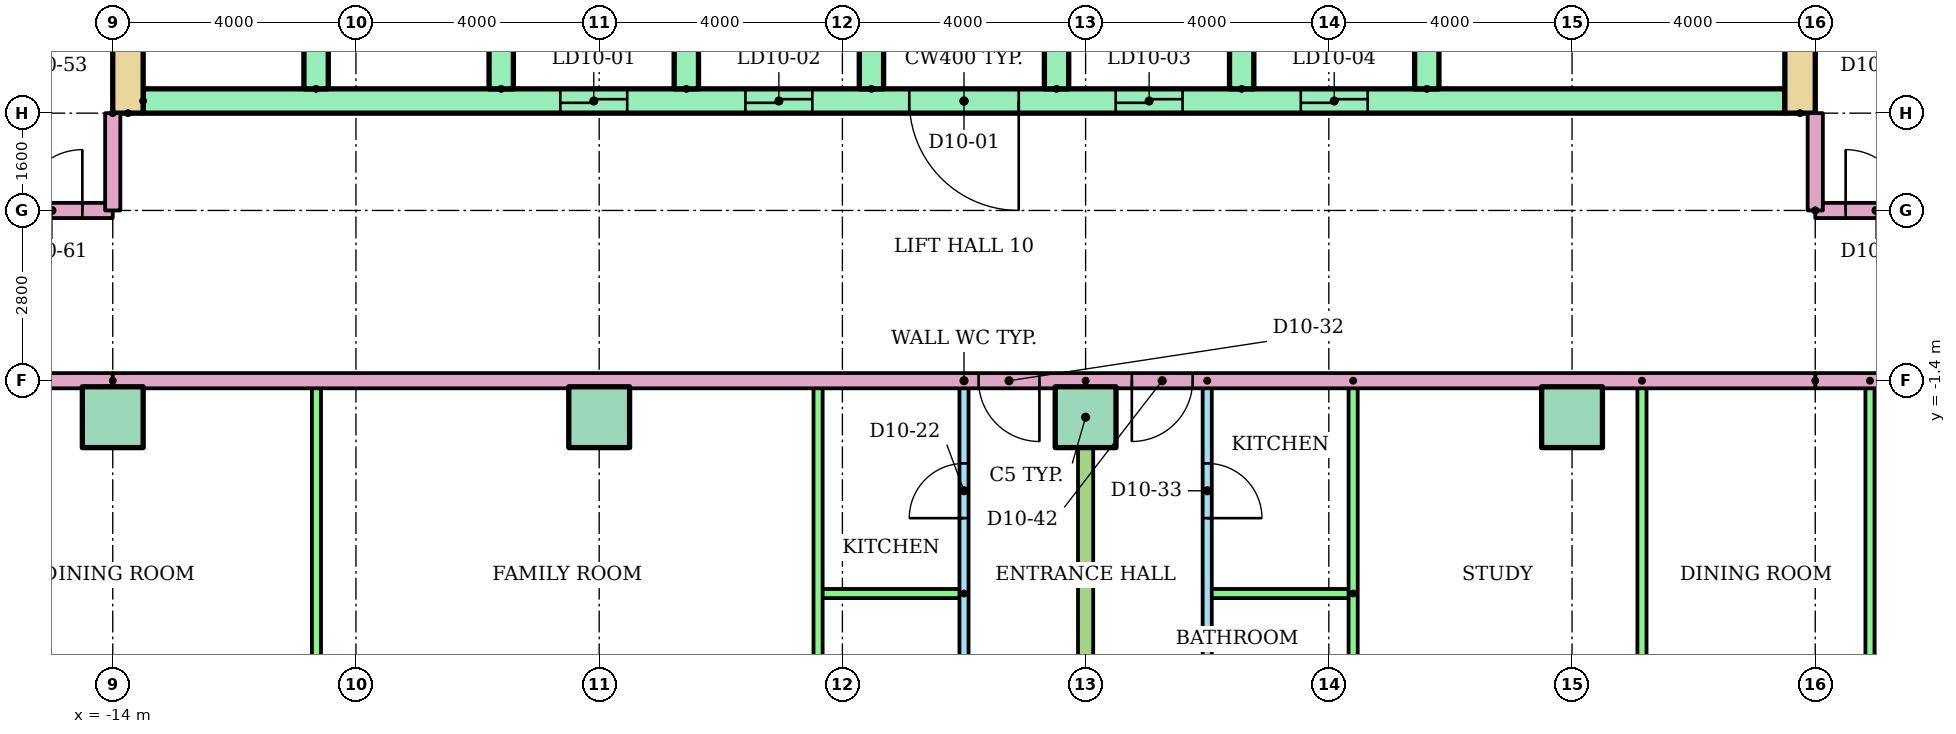
"""IFC4 building model, lengths in metres.
Left out: names, types, materials, properties, quantities, classifications, styles, units other than length and angle.
Written with IfcOpenShell. Run it as: python <this file> out.ifc"""

import sys

from ifc_helpers import new_model, si_unit, direction, frame, frame_2d, origin, origin_2d, place, context, subcontext, project, spatial, rectangle, extrude, element, fill, save


model = new_model("IFC4")
c1 = context("Model", 3, precision=1e-05, world=origin(), true_north=direction((0.0, 1.0)))
c2 = subcontext(c1, "Body", "Model", "MODEL_VIEW")
j1 = project(units=[si_unit("LENGTHUNIT", "METRE"), si_unit("PLANEANGLEUNIT", "RADIAN")], contexts=[c1])
p1 = place(None, origin())
s1 = spatial("IfcSite", under=j1, at=p1, CompositionType="ELEMENT")
p2 = place(p1, origin())
s2 = spatial("IfcBuilding", under=s1, at=p2, CompositionType="ELEMENT")
p3 = place(p2, frame((0.0, 0.0, 41.6)))
s3 = spatial("IfcBuildingStorey", under=s2, at=p3, CompositionType="ELEMENT", Elevation=41.6)
for number, where in (
    (1, (-14.0, -2.0, 0.0)),
    (2, (-6.0, -2.0, 0.0)),
    (3, (2.0, -2.0, 0.0)),
    (4, (10.0, -2.0, 0.0)),
):
    element("IfcColumn", number, at=place(p3, frame(where)), inside=s3, PredefinedType="COLUMN", context=c2, shape_type="SweptSolid", body=[
        extrude(rectangle(XDim=1.0, YDim=1.0, at=origin_2d()), origin(), (0.0, 0.0, 1.0), 3.2),
    ])
for number, where, z_axis, x_axis in (
    (5, (-13.75, 3.0, 0.0), (0.0, 0.0, 1.0), (0.0, 1.0, 0.0)),
    (6, (13.75, 3.0, 0.0), (0.0, 0.0, 1.0), (0.0, 1.0, 0.0)),
):
    element("IfcWall", number, at=place(p3, frame(where, z_axis=z_axis, x_axis=x_axis)), inside=s3, PredefinedType="SHEAR", context=c2, shape_type="SweptSolid", body=[
        extrude(rectangle(XDim=17.0, YDim=0.5, at=frame_2d((8.5, 0.0))), origin(), (0.0, 0.0, 1.0), 2.92),
    ])
p4 = place(p3, frame((-13.5, 3.2, 0.0)))
e7 = element("IfcWall", 7, at=p4, inside=s3, PredefinedType="SHEAR", context=c2, shape_type="SweptSolid", body=[
    extrude(rectangle(XDim=27.0, YDim=0.4, at=frame_2d((13.5, 0.0))), origin(), (0.0, 0.0, 1.0), 2.92),
])
p5 = place(p4, frame((6.861, 0.0, 0.0)))
e8 = element("IfcOpeningElement", 8, at=p5, cuts=e7, PredefinedType="OPENING", context=c2, shape_type="SweptSolid", body=[
    extrude(rectangle(XDim=1.1, YDim=2.1, at=frame_2d((0.55, 1.05))), frame((0.0, 0.21, 0.0), z_axis=(0.0, -1.0, 0.0), x_axis=(1.0, 0.0, 0.0)), (0.0, 0.0, 1.0), 0.42),
])
p6 = place(p4, frame((9.906, 0.0, 0.0)))
e9 = element("IfcOpeningElement", 9, at=p6, cuts=e7, PredefinedType="OPENING", context=c2, shape_type="SweptSolid", body=[
    extrude(rectangle(XDim=1.1, YDim=2.1, at=frame_2d((0.55, 1.05))), frame((0.0, 0.21, 0.0), z_axis=(0.0, -1.0, 0.0), x_axis=(1.0, 0.0, 0.0)), (0.0, 0.0, 1.0), 0.42),
])
p7 = place(p4, frame((15.994, 0.0, 0.0)))
e10 = element("IfcOpeningElement", 10, at=p7, cuts=e7, PredefinedType="OPENING", context=c2, shape_type="SweptSolid", body=[
    extrude(rectangle(XDim=1.1, YDim=2.1, at=frame_2d((0.55, 1.05))), frame((0.0, 0.21, 0.0), z_axis=(0.0, -1.0, 0.0), x_axis=(1.0, 0.0, 0.0)), (0.0, 0.0, 1.0), 0.42),
])
p8 = place(p4, frame((19.039, 0.0, 0.0)))
e11 = element("IfcOpeningElement", 11, at=p8, cuts=e7, PredefinedType="OPENING", context=c2, shape_type="SweptSolid", body=[
    extrude(rectangle(XDim=1.1, YDim=2.1, at=frame_2d((0.55, 1.05))), frame((0.0, 0.21, 0.0), z_axis=(0.0, -1.0, 0.0), x_axis=(1.0, 0.0, 0.0)), (0.0, 0.0, 1.0), 0.42),
])
p9 = place(p4, frame((12.6, 0.0, 0.0)))
e12 = element("IfcOpeningElement", 12, at=p9, cuts=e7, PredefinedType="OPENING", context=c2, shape_type="SweptSolid", body=[
    extrude(rectangle(XDim=1.8, YDim=2.1, at=frame_2d((0.9, 1.05))), frame((0.0, 0.21, 0.0), z_axis=(0.0, -1.0, 0.0), x_axis=(1.0, 0.0, 0.0)), (0.0, 0.0, 1.0), 0.42),
])
for number, where, z_axis, x_axis in (
    (13, (-10.656, 3.4, 0.0), (0.0, 0.0, 1.0), (0.0, 1.0, 0.0)),
    (14, (-7.611, 3.4, 0.0), (0.0, 0.0, 1.0), (0.0, 1.0, 0.0)),
    (15, (-4.567, 3.4, 0.0), (0.0, 0.0, 1.0), (0.0, 1.0, 0.0)),
    (16, (-1.522, 3.4, 0.0), (0.0, 0.0, 1.0), (0.0, 1.0, 0.0)),
    (17, (1.522, 3.4, 0.0), (0.0, 0.0, 1.0), (0.0, 1.0, 0.0)),
    (18, (4.567, 3.4, 0.0), (0.0, 0.0, 1.0), (0.0, 1.0, 0.0)),
    (19, (7.611, 3.4, 0.0), (0.0, 0.0, 1.0), (0.0, 1.0, 0.0)),
):
    element("IfcWall", number, at=place(p3, frame(where, z_axis=z_axis, x_axis=x_axis)), inside=s3, PredefinedType="SHEAR", context=c2, shape_type="SweptSolid", body=[
        extrude(rectangle(XDim=3.0, YDim=0.4, at=frame_2d((1.5, 0.0))), origin(), (0.0, 0.0, 1.0), 2.92),
    ])
p10 = place(p3, frame((0.0, -7.8, 0.0), z_axis=(0.0, 0.0, 1.0), x_axis=(0.0, 1.0, 0.0)))
e20 = element("IfcWall", 20, at=p10, inside=s3, PredefinedType="PARTITIONING", context=c2, shape_type="SweptSolid", body=[
    extrude(rectangle(XDim=6.4, YDim=0.15, at=frame_2d((3.2, 0.0))), origin(), (0.0, 0.0, 1.0), 2.4),
])
p11 = place(p10, frame((4.14, 0.0, 0.0)))
e21 = element("IfcOpeningElement", 21, at=p11, cuts=e20, PredefinedType="OPENING", context=c2, shape_type="SweptSolid", body=[
    extrude(rectangle(XDim=0.9, YDim=2.1, at=frame_2d((0.45, 1.05))), frame((0.0, 0.085, 0.0), z_axis=(0.0, -1.0, 0.0), x_axis=(1.0, 0.0, 0.0)), (0.0, 0.0, 1.0), 0.17),
])
p12 = place(p10, frame((1.05, 0.0, 0.0)))
e22 = element("IfcOpeningElement", 22, at=p12, cuts=e20, PredefinedType="OPENING", context=c2, shape_type="SweptSolid", body=[
    extrude(rectangle(XDim=0.8, YDim=2.1, at=frame_2d((0.4, 1.05))), frame((0.0, 0.085, 0.0), z_axis=(0.0, -1.0, 0.0), x_axis=(1.0, 0.0, 0.0)), (0.0, 0.0, 1.0), 0.17),
])
p13 = place(p3, frame((0.0, -4.9, 0.0), z_axis=(0.0, 0.0, 1.0), x_axis=(-1.0, 0.0, 0.0)))
e23 = element("IfcWall", 23, at=p13, inside=s3, PredefinedType="PARTITIONING", context=c2, shape_type="SweptSolid", body=[
    extrude(rectangle(XDim=2.4, YDim=0.15, at=frame_2d((1.2, 0.0))), origin(), (0.0, 0.0, 1.0), 2.4),
])
for number, where, z_axis, x_axis in (
    (24, (-2.4, -7.8, 0.0), (0.0, 0.0, 1.0), (0.0, 1.0, 0.0)),
    (25, (-10.65, -7.8, 0.0), (0.0, 0.0, 1.0), (0.0, 1.0, 0.0)),
):
    element("IfcWall", number, at=place(p3, frame(where, z_axis=z_axis, x_axis=x_axis)), inside=s3, PredefinedType="PARTITIONING", context=c2, shape_type="SweptSolid", body=[
        extrude(rectangle(XDim=6.4, YDim=0.15, at=frame_2d((3.2, 0.0))), origin(), (0.0, 0.0, 1.0), 2.4),
    ])
p14 = place(p3, frame((4.0, -1.4, 0.0), z_axis=(0.0, 0.0, 1.0), x_axis=(0.0, -1.0, 0.0)))
e26 = element("IfcWall", 26, at=p14, inside=s3, PredefinedType="PARTITIONING", context=c2, shape_type="SweptSolid", body=[
    extrude(rectangle(XDim=6.4, YDim=0.15, at=frame_2d((3.2, 0.0))), origin(), (0.0, 0.0, 1.0), 2.4),
])
p15 = place(p14, frame((1.36, 0.0, 0.0)))
e27 = element("IfcOpeningElement", 27, at=p15, cuts=e26, PredefinedType="OPENING", context=c2, shape_type="SweptSolid", body=[
    extrude(rectangle(XDim=0.9, YDim=2.1, at=frame_2d((0.45, 1.05))), frame((0.0, 0.085, 0.0), z_axis=(0.0, -1.0, 0.0), x_axis=(1.0, 0.0, 0.0)), (0.0, 0.0, 1.0), 0.17),
])
p16 = place(p14, frame((4.55, 0.0, 0.0)))
e28 = element("IfcOpeningElement", 28, at=p16, cuts=e26, PredefinedType="OPENING", context=c2, shape_type="SweptSolid", body=[
    extrude(rectangle(XDim=0.8, YDim=2.1, at=frame_2d((0.4, 1.05))), frame((0.0, 0.085, 0.0), z_axis=(0.0, -1.0, 0.0), x_axis=(1.0, 0.0, 0.0)), (0.0, 0.0, 1.0), 0.17),
])
p17 = place(p3, frame((6.4, -4.9, 0.0), z_axis=(0.0, 0.0, 1.0), x_axis=(-1.0, 0.0, 0.0)))
e29 = element("IfcWall", 29, at=p17, inside=s3, PredefinedType="PARTITIONING", context=c2, shape_type="SweptSolid", body=[
    extrude(rectangle(XDim=2.4, YDim=0.15, at=frame_2d((1.2, 0.0))), origin(), (0.0, 0.0, 1.0), 2.4),
])
for number, where, z_axis, x_axis in (
    (30, (6.4, -1.4, 0.0), (0.0, 0.0, 1.0), (0.0, -1.0, 0.0)),
    (31, (11.15, -1.4, 0.0), (0.0, 0.0, 1.0), (0.0, -1.0, 0.0)),
    (32, (14.9, -1.4, 0.0), (0.0, 0.0, 1.0), (0.0, -1.0, 0.0)),
):
    element("IfcWall", number, at=place(p3, frame(where, z_axis=z_axis, x_axis=x_axis)), inside=s3, PredefinedType="PARTITIONING", context=c2, shape_type="SweptSolid", body=[
        extrude(rectangle(XDim=6.4, YDim=0.15, at=frame_2d((3.2, 0.0))), origin(), (0.0, 0.0, 1.0), 2.4),
    ])
p18 = place(p3, frame((2.0, -1.4, 0.0), z_axis=(0.0, 0.0, 1.0), x_axis=(0.0, -1.0, 0.0)))
e33 = element("IfcWall", 33, at=p18, inside=s3, PredefinedType="PARTITIONING", context=c2, shape_type="SweptSolid", body=[
    extrude(rectangle(XDim=14.71, YDim=0.25, at=frame_2d((7.355, 0.0))), origin(), (0.0, 0.0, 1.0), 2.4),
])
p19 = place(p3, frame((-14.0, -1.4, 0.0), z_axis=(0.0, 0.0, 1.0), x_axis=(-1.0, 0.0, 0.0)))
e34 = element("IfcWall", 34, at=p19, inside=s3, PredefinedType="PARTITIONING", context=c2, shape_type="SweptSolid", body=[
    extrude(rectangle(XDim=15.0, YDim=0.25, at=frame_2d((7.5, 0.0))), origin(), (0.0, 0.0, 1.0), 2.4),
])
p20 = place(p19, frame((8.76, 0.0, 0.0)))
e35 = element("IfcOpeningElement", 35, at=p20, cuts=e34, PredefinedType="OPENING", context=c2, shape_type="SweptSolid", body=[
    extrude(rectangle(XDim=1.0, YDim=2.1, at=frame_2d((0.5, 1.05))), frame((0.0, 0.135, 0.0), z_axis=(0.0, -1.0, 0.0), x_axis=(1.0, 0.0, 0.0)), (0.0, 0.0, 1.0), 0.27),
])
p21 = place(p3, frame((29.0, -1.4, 0.0), z_axis=(0.0, 0.0, 1.0), x_axis=(-1.0, 0.0, 0.0)))
e36 = element("IfcWall", 36, at=p21, inside=s3, PredefinedType="PARTITIONING", context=c2, shape_type="SweptSolid", body=[
    extrude(rectangle(XDim=15.0, YDim=0.25, at=frame_2d((7.5, 0.0))), origin(), (0.0, 0.0, 1.0), 2.4),
])
p22 = place(p21, frame((9.24, 0.0, 0.0)))
e37 = element("IfcOpeningElement", 37, at=p22, cuts=e36, PredefinedType="OPENING", context=c2, shape_type="SweptSolid", body=[
    extrude(rectangle(XDim=1.0, YDim=2.1, at=frame_2d((0.5, 1.05))), frame((0.0, 0.135, 0.0), z_axis=(0.0, -1.0, 0.0), x_axis=(1.0, 0.0, 0.0)), (0.0, 0.0, 1.0), 0.27),
])
p23 = place(p3, frame((-29.0, 1.4, 0.0)))
e38 = element("IfcWall", 38, at=p23, inside=s3, PredefinedType="PARTITIONING", context=c2, shape_type="SweptSolid", body=[
    extrude(rectangle(XDim=15.0, YDim=0.25, at=frame_2d((7.5, 0.0))), origin(), (0.0, 0.0, 1.0), 2.4),
])
p24 = place(p23, frame((13.5, 0.0, 0.0)))
e39 = element("IfcOpeningElement", 39, at=p24, cuts=e38, PredefinedType="OPENING", context=c2, shape_type="SweptSolid", body=[
    extrude(rectangle(XDim=1.0, YDim=2.1, at=frame_2d((0.5, 1.05))), frame((0.0, 0.135, 0.0), z_axis=(0.0, -1.0, 0.0), x_axis=(1.0, 0.0, 0.0)), (0.0, 0.0, 1.0), 0.27),
])
p25 = place(p3, frame((14.0, 1.4, 0.0)))
e40 = element("IfcWall", 40, at=p25, inside=s3, PredefinedType="PARTITIONING", context=c2, shape_type="SweptSolid", body=[
    extrude(rectangle(XDim=15.0, YDim=0.25, at=frame_2d((7.5, 0.0))), origin(), (0.0, 0.0, 1.0), 2.4),
])
p26 = place(p25, frame((0.5, 0.0, 0.0)))
e41 = element("IfcOpeningElement", 41, at=p26, cuts=e40, PredefinedType="OPENING", context=c2, shape_type="SweptSolid", body=[
    extrude(rectangle(XDim=1.0, YDim=2.1, at=frame_2d((0.5, 1.05))), frame((0.0, 0.135, 0.0), z_axis=(0.0, -1.0, 0.0), x_axis=(1.0, 0.0, 0.0)), (0.0, 0.0, 1.0), 0.27),
])
p27 = place(p25, frame((12.76, 0.0, 0.0)))
e42 = element("IfcOpeningElement", 42, at=p27, cuts=e40, PredefinedType="OPENING", context=c2, shape_type="SweptSolid", body=[
    extrude(rectangle(XDim=1.0, YDim=2.1, at=frame_2d((0.5, 1.05))), frame((0.0, 0.135, 0.0), z_axis=(0.0, -1.0, 0.0), x_axis=(1.0, 0.0, 0.0)), (0.0, 0.0, 1.0), 0.27),
])
p28 = place(p3, frame((14.0, -1.4, 0.0), z_axis=(0.0, 0.0, 1.0), x_axis=(-1.0, 0.0, 0.0)))
e43 = element("IfcWall", 43, at=p28, inside=s3, PredefinedType="PARTITIONING", context=c2, shape_type="SweptSolid", body=[
    extrude(rectangle(XDim=28.0, YDim=0.25, at=frame_2d((14.0, 0.0))), origin(), (0.0, 0.0, 1.0), 2.4),
])
p29 = place(p28, frame((12.76, 0.0, 0.0)))
e44 = element("IfcOpeningElement", 44, at=p29, cuts=e43, PredefinedType="OPENING", context=c2, shape_type="SweptSolid", body=[
    extrude(rectangle(XDim=1.0, YDim=2.1, at=frame_2d((0.5, 1.05))), frame((0.0, 0.135, 0.0), z_axis=(0.0, -1.0, 0.0), x_axis=(1.0, 0.0, 0.0)), (0.0, 0.0, 1.0), 0.27),
])
p30 = place(p28, frame((10.24, 0.0, 0.0)))
e45 = element("IfcOpeningElement", 45, at=p30, cuts=e43, PredefinedType="OPENING", context=c2, shape_type="SweptSolid", body=[
    extrude(rectangle(XDim=1.0, YDim=2.1, at=frame_2d((0.5, 1.05))), frame((0.0, 0.135, 0.0), z_axis=(0.0, -1.0, 0.0), x_axis=(1.0, 0.0, 0.0)), (0.0, 0.0, 1.0), 0.27),
])
for number, where, z_axis, x_axis in (
    (46, (-14.0, 3.0, 0.0), (0.0, 0.0, 1.0), (0.0, -1.0, 0.0)),
    (47, (14.0, 1.4, 0.0), (0.0, 0.0, 1.0), (0.0, 1.0, 0.0)),
):
    element("IfcWall", number, at=place(p3, frame(where, z_axis=z_axis, x_axis=x_axis)), inside=s3, PredefinedType="PARTITIONING", context=c2, shape_type="SweptSolid", body=[
        extrude(rectangle(XDim=1.6, YDim=0.25, at=frame_2d((0.8, 0.0))), origin(), (0.0, 0.0, 1.0), 2.4),
    ])
p31 = place(p5, origin())
e48 = element("IfcDoor", 48, at=p31, inside=s3, OperationType="SLIDING_TO_LEFT", PredefinedType="DOOR", context=c2, shape_type="SweptSolid", body=[
    extrude(rectangle(XDim=1.1, YDim=2.1, at=frame_2d((0.55, 1.05))), frame((0.0, 0.025, 0.0), z_axis=(0.0, -1.0, 0.0), x_axis=(1.0, 0.0, 0.0)), (0.0, 0.0, 1.0), 0.05),
])
fill(e8, e48)
p32 = place(p6, origin())
e49 = element("IfcDoor", 49, at=p32, inside=s3, OperationType="SLIDING_TO_LEFT", PredefinedType="DOOR", context=c2, shape_type="SweptSolid", body=[
    extrude(rectangle(XDim=1.1, YDim=2.1, at=frame_2d((0.55, 1.05))), frame((0.0, 0.025, 0.0), z_axis=(0.0, -1.0, 0.0), x_axis=(1.0, 0.0, 0.0)), (0.0, 0.0, 1.0), 0.05),
])
fill(e9, e49)
p33 = place(p7, origin())
e50 = element("IfcDoor", 50, at=p33, inside=s3, OperationType="SLIDING_TO_LEFT", PredefinedType="DOOR", context=c2, shape_type="SweptSolid", body=[
    extrude(rectangle(XDim=1.1, YDim=2.1, at=frame_2d((0.55, 1.05))), frame((0.0, 0.025, 0.0), z_axis=(0.0, -1.0, 0.0), x_axis=(1.0, 0.0, 0.0)), (0.0, 0.0, 1.0), 0.05),
])
fill(e10, e50)
p34 = place(p8, origin())
e51 = element("IfcDoor", 51, at=p34, inside=s3, OperationType="SLIDING_TO_LEFT", PredefinedType="DOOR", context=c2, shape_type="SweptSolid", body=[
    extrude(rectangle(XDim=1.1, YDim=2.1, at=frame_2d((0.55, 1.05))), frame((0.0, 0.025, 0.0), z_axis=(0.0, -1.0, 0.0), x_axis=(1.0, 0.0, 0.0)), (0.0, 0.0, 1.0), 0.05),
])
fill(e11, e51)
p35 = place(p9, frame((1.8, 0.0, 0.0), z_axis=(0.0, 0.0, 1.0), x_axis=(-1.0, 0.0, 0.0)))
e52 = element("IfcDoor", 52, at=p35, inside=s3, OperationType="DOUBLE_DOOR_SINGLE_SWING", PredefinedType="DOOR", context=c2, shape_type="SweptSolid", body=[
    extrude(rectangle(XDim=1.8, YDim=2.1, at=frame_2d((0.9, 1.05))), frame((0.0, 0.025, 0.0), z_axis=(0.0, -1.0, 0.0), x_axis=(1.0, 0.0, 0.0)), (0.0, 0.0, 1.0), 0.05),
])
fill(e12, e52)
p36 = place(p11, origin())
e53 = element("IfcDoor", 53, at=p36, inside=s3, OperationType="SINGLE_SWING_LEFT", PredefinedType="DOOR", context=c2, shape_type="SweptSolid", body=[
    extrude(rectangle(XDim=0.9, YDim=2.1, at=frame_2d((0.45, 1.05))), frame((0.0, 0.025, 0.0), z_axis=(0.0, -1.0, 0.0), x_axis=(1.0, 0.0, 0.0)), (0.0, 0.0, 1.0), 0.05),
])
fill(e21, e53)
p37 = place(p29, origin())
e54 = element("IfcDoor", 54, at=p37, inside=s3, OperationType="SINGLE_SWING_LEFT", PredefinedType="DOOR", context=c2, shape_type="SweptSolid", body=[
    extrude(rectangle(XDim=1.0, YDim=2.1, at=frame_2d((0.5, 1.05))), frame((0.0, 0.025, 0.0), z_axis=(0.0, -1.0, 0.0), x_axis=(1.0, 0.0, 0.0)), (0.0, 0.0, 1.0), 0.05),
])
fill(e44, e54)
p38 = place(p15, origin())
e55 = element("IfcDoor", 55, at=p38, inside=s3, OperationType="SINGLE_SWING_RIGHT", PredefinedType="DOOR", context=c2, shape_type="SweptSolid", body=[
    extrude(rectangle(XDim=0.9, YDim=2.1, at=frame_2d((0.45, 1.05))), frame((0.0, 0.025, 0.0), z_axis=(0.0, -1.0, 0.0), x_axis=(1.0, 0.0, 0.0)), (0.0, 0.0, 1.0), 0.05),
])
fill(e27, e55)
p39 = place(p30, origin())
e56 = element("IfcDoor", 56, at=p39, inside=s3, OperationType="SINGLE_SWING_RIGHT", PredefinedType="DOOR", context=c2, shape_type="SweptSolid", body=[
    extrude(rectangle(XDim=1.0, YDim=2.1, at=frame_2d((0.5, 1.05))), frame((0.0, 0.025, 0.0), z_axis=(0.0, -1.0, 0.0), x_axis=(1.0, 0.0, 0.0)), (0.0, 0.0, 1.0), 0.05),
])
fill(e45, e56)
p40 = place(p24, origin())
e57 = element("IfcDoor", 57, at=p40, inside=s3, OperationType="SINGLE_SWING_RIGHT", PredefinedType="DOOR", context=c2, shape_type="SweptSolid", body=[
    extrude(rectangle(XDim=1.0, YDim=2.1, at=frame_2d((0.5, 1.05))), frame((0.0, 0.025, 0.0), z_axis=(0.0, -1.0, 0.0), x_axis=(1.0, 0.0, 0.0)), (0.0, 0.0, 1.0), 0.05),
])
fill(e39, e57)
p41 = place(p26, origin())
e58 = element("IfcDoor", 58, at=p41, inside=s3, OperationType="SINGLE_SWING_LEFT", PredefinedType="DOOR", context=c2, shape_type="SweptSolid", body=[
    extrude(rectangle(XDim=1.0, YDim=2.1, at=frame_2d((0.5, 1.05))), frame((0.0, 0.025, 0.0), z_axis=(0.0, -1.0, 0.0), x_axis=(1.0, 0.0, 0.0)), (0.0, 0.0, 1.0), 0.05),
])
fill(e41, e58)
save(model, sys.argv[1])
